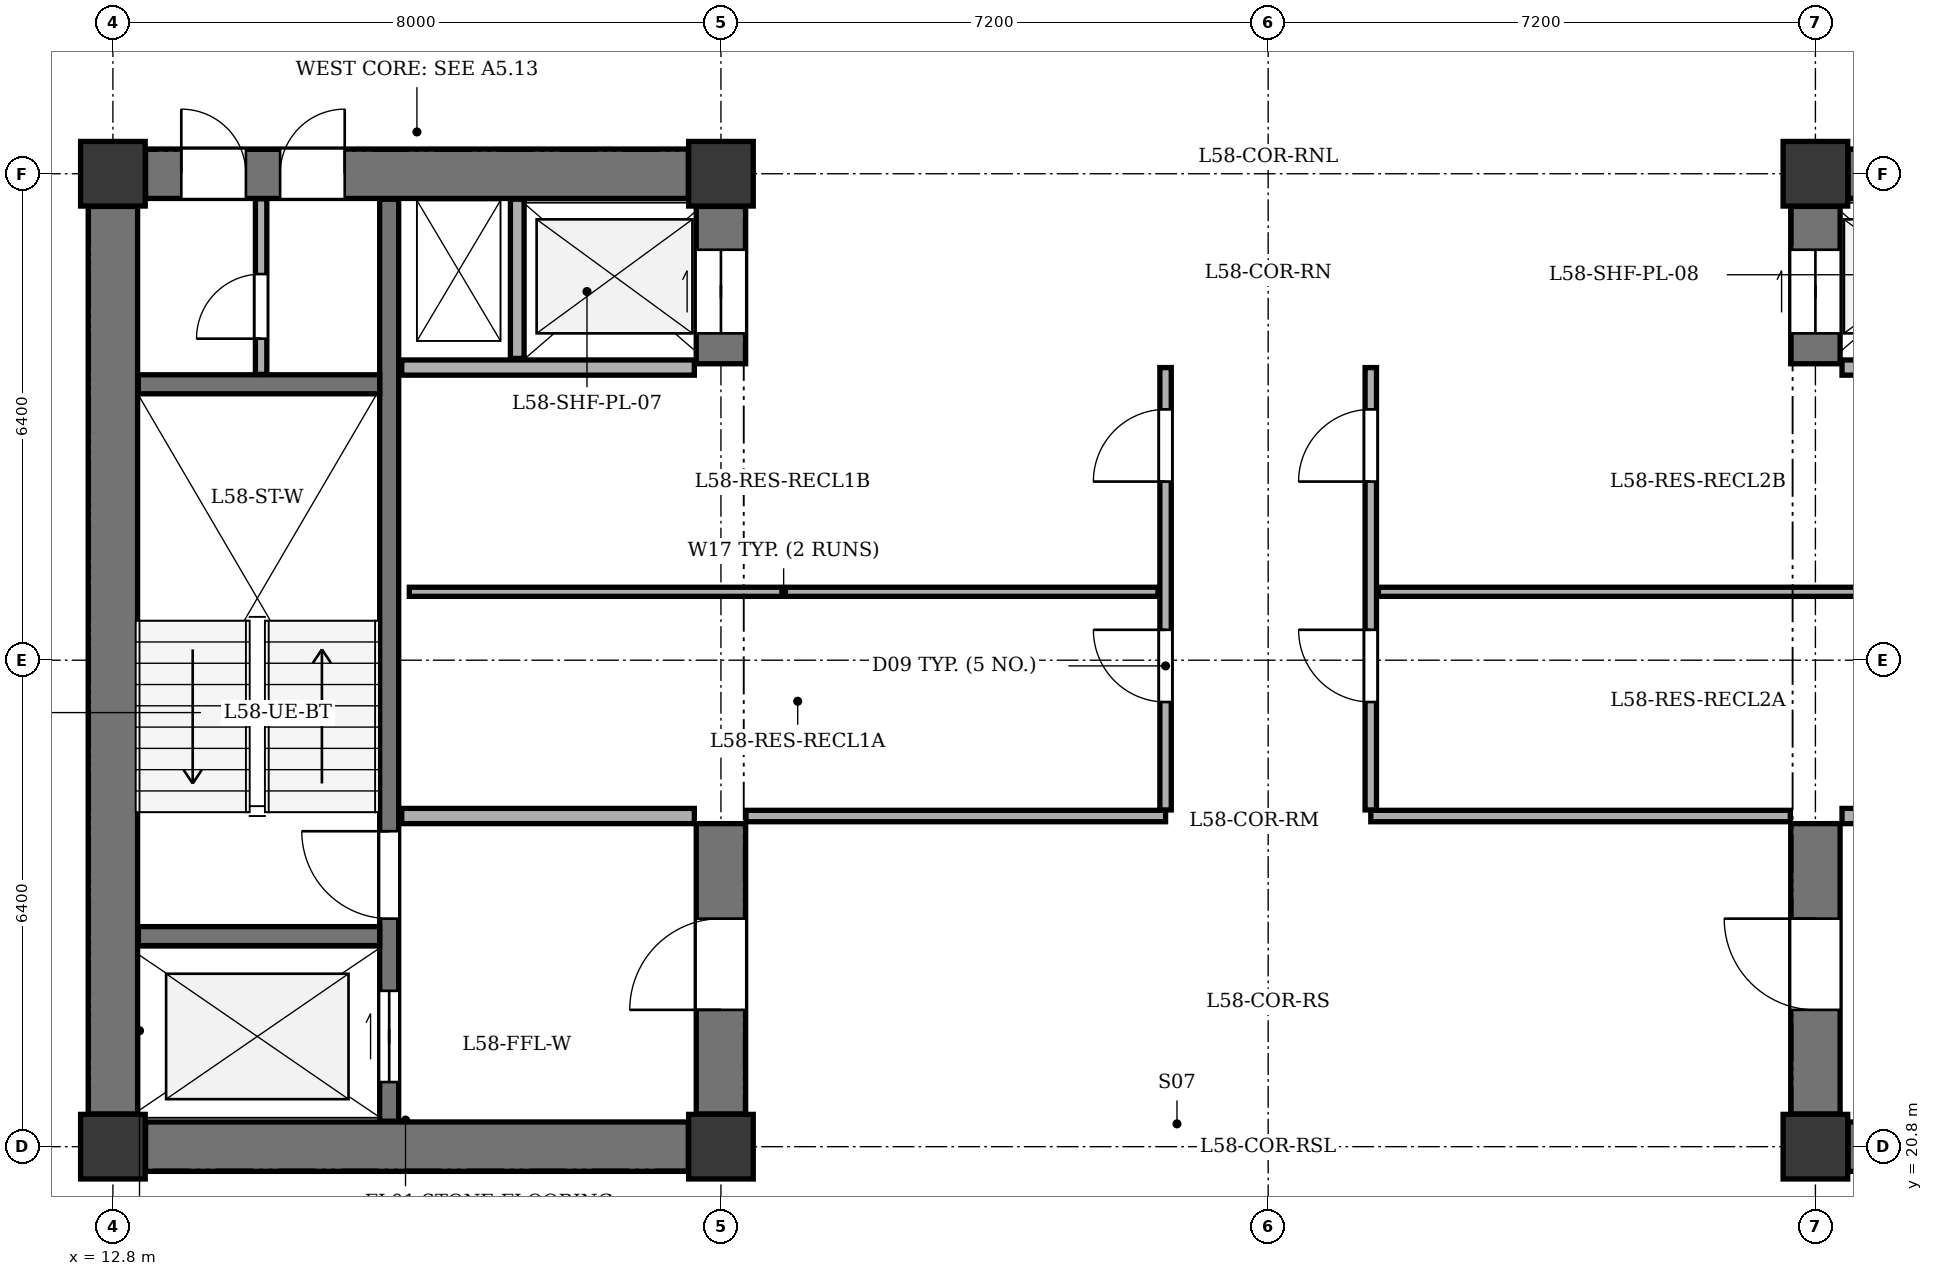
"""IFC4 building model, lengths in metres.
Left out: names, types, materials, properties, quantities, classifications, styles, units other than length and angle.
Written with IfcOpenShell. Run it as: python <this file> out.ifc"""

import sys

from ifc_helpers import new_model, si_unit, direction, frame, frame_2d, origin, origin_2d, place, context, subcontext, project, spatial, rectangle, extrude, element, fill, save


model = new_model("IFC4")
c1 = context("Model", 3, precision=1e-05, world=origin(), true_north=direction((0.0, 1.0)))
c2 = subcontext(c1, "Body", "Model", "MODEL_VIEW")
j1 = project(units=[si_unit("LENGTHUNIT", "METRE"), si_unit("PLANEANGLEUNIT", "RADIAN")], contexts=[c1])
p1 = place(None, origin())
s1 = spatial("IfcSite", under=j1, at=p1, CompositionType="ELEMENT")
p2 = place(p1, origin())
s2 = spatial("IfcBuilding", under=s1, at=p2, CompositionType="ELEMENT")
p3 = place(p2, frame((0.0, 0.0, 224.5)))
s3 = spatial("IfcBuildingStorey", under=s2, at=p3, CompositionType="ELEMENT", Elevation=224.5)
for number, where, z_axis, x_axis in (
    (1, (12.8, 20.8, 0.0), (0.0, 0.0, 1.0), (1.0, 0.0, 0.0)),
    (2, (20.8, 20.8, 0.0), (0.0, 0.0, 1.0), (1.0, 0.0, 0.0)),
    (3, (12.8, 33.6, 0.0), (0.0, 0.0, 1.0), (1.0, 0.0, 0.0)),
    (4, (20.8, 33.6, 0.0), (0.0, 0.0, 1.0), (1.0, 0.0, 0.0)),
    (5, (35.2, 20.8, 0.0), (0.0, 0.0, 1.0), (1.0, 0.0, 0.0)),
    (6, (35.2, 33.6, 0.0), (0.0, 0.0, 1.0), (1.0, 0.0, 0.0)),
):
    element("IfcColumn", number, at=place(p3, frame(where, z_axis=z_axis, x_axis=x_axis)), inside=s3, PredefinedType="COLUMN", context=c2, shape_type="SweptSolid", body=[
        extrude(rectangle(XDim=0.85, YDim=0.85, at=origin_2d()), origin(), (0.0, 0.0, 1.0), 3.4),
    ])
p4 = place(p3, frame((12.8, 21.23, 0.0), z_axis=(0.0, 0.0, 1.0), x_axis=(0.0, 1.0, 0.0)))
e7 = element("IfcWall", 7, at=p4, inside=s3, PredefinedType="SHEAR", context=c2, shape_type="SweptSolid", body=[
    extrude(rectangle(XDim=11.94, YDim=0.65, at=frame_2d((5.97, 0.0))), origin(), (0.0, 0.0, 1.0), 2.95),
])
p5 = place(p3, frame((13.23, 20.8, 0.0), z_axis=(0.0, 0.0, 1.0), x_axis=(1.0, 0.0, 0.0)))
e8 = element("IfcWall", 8, at=p5, inside=s3, PredefinedType="SHEAR", context=c2, shape_type="SweptSolid", body=[
    extrude(rectangle(XDim=7.14, YDim=0.65, at=frame_2d((3.57, 0.0))), origin(), (0.0, 0.0, 1.0), 2.95),
])
p6 = place(p3, frame((13.23, 33.6, 0.0), z_axis=(0.0, 0.0, 1.0), x_axis=(1.0, 0.0, 0.0)))
e9 = element("IfcWall", 9, at=p6, inside=s3, PredefinedType="SHEAR", context=c2, shape_type="SweptSolid", body=[
    extrude(rectangle(XDim=7.14, YDim=0.65, at=frame_2d((3.57, 0.0))), origin(), (0.0, 0.0, 1.0), 2.95),
])
p7 = place(p6, frame((0.47, 0.0, 0.0)))
e10 = element("IfcOpeningElement", 10, at=p7, cuts=e9, PredefinedType="OPENING", context=c2, shape_type="SweptSolid", body=[
    extrude(rectangle(XDim=0.85, YDim=2.02, at=frame_2d((0.425, 1.01))), frame((0.0, 0.335, 0.0), z_axis=(0.0, -1.0, 0.0), x_axis=(1.0, 0.0, 0.0)), (0.0, 0.0, 1.0), 0.67),
])
p8 = place(p6, frame((1.77, 0.0, 0.0)))
e11 = element("IfcOpeningElement", 11, at=p8, cuts=e9, PredefinedType="OPENING", context=c2, shape_type="SweptSolid", body=[
    extrude(rectangle(XDim=0.85, YDim=2.02, at=frame_2d((0.425, 1.01))), frame((0.0, 0.335, 0.0), z_axis=(0.0, -1.0, 0.0), x_axis=(1.0, 0.0, 0.0)), (0.0, 0.0, 1.0), 0.67),
])
p9 = place(p3, frame((20.8, 21.23, 0.0), z_axis=(0.0, 0.0, 1.0), x_axis=(0.0, 1.0, 0.0)))
e12 = element("IfcWall", 12, at=p9, inside=s3, PredefinedType="SHEAR", context=c2, shape_type="SweptSolid", body=[
    extrude(rectangle(XDim=3.82, YDim=0.65, at=frame_2d((1.91, 0.0))), origin(), (0.0, 0.0, 1.0), 2.95),
])
p10 = place(p9, frame((1.37, 0.0, 0.0)))
e13 = element("IfcOpeningElement", 13, at=p10, cuts=e12, PredefinedType="OPENING", context=c2, shape_type="SweptSolid", body=[
    extrude(rectangle(XDim=1.2, YDim=2.15, at=frame_2d((0.6, 1.075))), frame((0.0, 0.335, 0.0), z_axis=(0.0, -1.0, 0.0), x_axis=(1.0, 0.0, 0.0)), (0.0, 0.0, 1.0), 0.67),
])
p11 = place(p3, frame((20.8, 31.1, 0.0), z_axis=(0.0, 0.0, 1.0), x_axis=(0.0, 1.0, 0.0)))
e14 = element("IfcWall", 14, at=p11, inside=s3, PredefinedType="SHEAR", context=c2, shape_type="SweptSolid", body=[
    extrude(rectangle(XDim=2.07, YDim=0.65, at=frame_2d((1.035, 0.0))), origin(), (0.0, 0.0, 1.0), 2.95),
])
p12 = place(p11, frame((0.4, 0.0, 0.0)))
e15 = element("IfcOpeningElement", 15, at=p12, cuts=e14, PredefinedType="OPENING", context=c2, shape_type="SweptSolid", body=[
    extrude(rectangle(XDim=1.1, YDim=2.1, at=frame_2d((0.55, 1.05))), frame((0.0, 0.335, 0.0), z_axis=(0.0, -1.0, 0.0), x_axis=(1.0, 0.0, 0.0)), (0.0, 0.0, 1.0), 0.67),
])
p13 = place(p3, frame((16.435, 21.135, 0.0), z_axis=(0.0, 0.0, 1.0), x_axis=(0.0, 1.0, 0.0)))
e16 = element("IfcWall", 16, at=p13, inside=s3, PredefinedType="SHEAR", context=c2, shape_type="SweptSolid", body=[
    extrude(rectangle(XDim=12.13, YDim=0.25, at=frame_2d((6.065, 0.0))), origin(), (0.0, 0.0, 1.0), 2.95),
])
p14 = place(p13, frame((0.515, 0.0, 0.0)))
e17 = element("IfcOpeningElement", 17, at=p14, cuts=e16, PredefinedType="OPENING", context=c2, shape_type="SweptSolid", body=[
    extrude(rectangle(XDim=1.2, YDim=2.15, at=frame_2d((0.6, 1.075))), frame((0.0, 0.135, 0.0), z_axis=(0.0, -1.0, 0.0), x_axis=(1.0, 0.0, 0.0)), (0.0, 0.0, 1.0), 0.27),
])
p15 = place(p13, frame((2.665, 0.0, 0.0)))
e18 = element("IfcOpeningElement", 18, at=p15, cuts=e16, PredefinedType="OPENING", context=c2, shape_type="SweptSolid", body=[
    extrude(rectangle(XDim=1.15, YDim=2.15, at=frame_2d((0.575, 1.075))), frame((0.0, 0.135, 0.0), z_axis=(0.0, -1.0, 0.0), x_axis=(1.0, 0.0, 0.0)), (0.0, 0.0, 1.0), 0.27),
])
for number, where, z_axis, x_axis in (
    (19, (13.135, 23.57, 0.0), (0.0, 0.0, 1.0), (1.0, 0.0, 0.0)),
    (20, (13.135, 30.83, 0.0), (0.0, 0.0, 1.0), (1.0, 0.0, 0.0)),
):
    element("IfcWall", number, at=place(p3, frame(where, z_axis=z_axis, x_axis=x_axis)), inside=s3, PredefinedType="SHEAR", context=c2, shape_type="SweptSolid", body=[
        extrude(rectangle(XDim=3.175, YDim=0.25, at=frame_2d((1.587, 0.0))), origin(), (0.0, 0.0, 1.0), 2.95),
    ])
for number, where, z_axis, x_axis in (
    (21, (16.6, 25.15, 0.0), (0.0, 0.0, 1.0), (1.0, 0.0, 0.0)),
    (22, (16.6, 31.05, 0.0), (0.0, 0.0, 1.0), (1.0, 0.0, 0.0)),
):
    element("IfcWall", number, at=place(p3, frame(where, z_axis=z_axis, x_axis=x_axis)), inside=s3, PredefinedType="SOLIDWALL", context=c2, shape_type="SweptSolid", body=[
        extrude(rectangle(XDim=3.85, YDim=0.2, at=frame_2d((1.925, 0.0))), origin(), (0.0, 0.0, 1.0), 2.95),
    ])
p16 = place(p3, frame((18.12, 31.17, 0.0), z_axis=(0.0, 0.0, 1.0), x_axis=(0.0, 1.0, 0.0)))
e23 = element("IfcWall", 23, at=p16, inside=s3, PredefinedType="PARTITIONING", context=c2, shape_type="SweptSolid", body=[
    extrude(rectangle(XDim=2.095, YDim=0.18, at=frame_2d((1.047, 0.0))), origin(), (0.0, 0.0, 1.0), 2.95),
])
p17 = place(p3, frame((35.63, 20.8, 0.0), z_axis=(0.0, 0.0, 1.0), x_axis=(1.0, 0.0, 0.0)))
e24 = element("IfcWall", 24, at=p17, inside=s3, PredefinedType="SHEAR", context=c2, shape_type="SweptSolid", body=[
    extrude(rectangle(XDim=7.14, YDim=0.65, at=frame_2d((3.57, 0.0))), origin(), (0.0, 0.0, 1.0), 2.95),
])
p18 = place(p3, frame((35.63, 33.6, 0.0), z_axis=(0.0, 0.0, 1.0), x_axis=(1.0, 0.0, 0.0)))
e25 = element("IfcWall", 25, at=p18, inside=s3, PredefinedType="SHEAR", context=c2, shape_type="SweptSolid", body=[
    extrude(rectangle(XDim=7.14, YDim=0.65, at=frame_2d((3.57, 0.0))), origin(), (0.0, 0.0, 1.0), 2.95),
])
p19 = place(p18, frame((4.77, 0.0, 0.0)))
e26 = element("IfcOpeningElement", 26, at=p19, cuts=e25, PredefinedType="OPENING", context=c2, shape_type="SweptSolid", body=[
    extrude(rectangle(XDim=1.3, YDim=2.15, at=frame_2d((0.65, 1.075))), frame((0.0, 0.335, 0.0), z_axis=(0.0, -1.0, 0.0), x_axis=(1.0, 0.0, 0.0)), (0.0, 0.0, 1.0), 0.67),
])
p20 = place(p18, frame((2.57, 0.0, 0.0)))
e27 = element("IfcOpeningElement", 27, at=p20, cuts=e25, PredefinedType="OPENING", context=c2, shape_type="SweptSolid", body=[
    extrude(rectangle(XDim=0.85, YDim=2.02, at=frame_2d((0.425, 1.01))), frame((0.0, 0.335, 0.0), z_axis=(0.0, -1.0, 0.0), x_axis=(1.0, 0.0, 0.0)), (0.0, 0.0, 1.0), 0.67),
])
p21 = place(p3, frame((35.2, 21.23, 0.0), z_axis=(0.0, 0.0, 1.0), x_axis=(0.0, 1.0, 0.0)))
e28 = element("IfcWall", 28, at=p21, inside=s3, PredefinedType="SHEAR", context=c2, shape_type="SweptSolid", body=[
    extrude(rectangle(XDim=3.82, YDim=0.65, at=frame_2d((1.91, 0.0))), origin(), (0.0, 0.0, 1.0), 2.95),
])
p22 = place(p21, frame((1.37, 0.0, 0.0)))
e29 = element("IfcOpeningElement", 29, at=p22, cuts=e28, PredefinedType="OPENING", context=c2, shape_type="SweptSolid", body=[
    extrude(rectangle(XDim=1.2, YDim=2.15, at=frame_2d((0.6, 1.075))), frame((0.0, 0.335, 0.0), z_axis=(0.0, -1.0, 0.0), x_axis=(1.0, 0.0, 0.0)), (0.0, 0.0, 1.0), 0.67),
])
p23 = place(p3, frame((35.2, 31.1, 0.0), z_axis=(0.0, 0.0, 1.0), x_axis=(0.0, 1.0, 0.0)))
e30 = element("IfcWall", 30, at=p23, inside=s3, PredefinedType="SHEAR", context=c2, shape_type="SweptSolid", body=[
    extrude(rectangle(XDim=2.07, YDim=0.65, at=frame_2d((1.035, 0.0))), origin(), (0.0, 0.0, 1.0), 2.95),
])
p24 = place(p23, frame((0.4, 0.0, 0.0)))
e31 = element("IfcOpeningElement", 31, at=p24, cuts=e30, PredefinedType="OPENING", context=c2, shape_type="SweptSolid", body=[
    extrude(rectangle(XDim=1.1, YDim=2.1, at=frame_2d((0.55, 1.05))), frame((0.0, 0.335, 0.0), z_axis=(0.0, -1.0, 0.0), x_axis=(1.0, 0.0, 0.0)), (0.0, 0.0, 1.0), 0.67),
])
p25 = place(p3, frame((35.55, 25.15, 0.0), z_axis=(0.0, 0.0, 1.0), x_axis=(1.0, 0.0, 0.0)))
e32 = element("IfcWall", 32, at=p25, inside=s3, PredefinedType="SOLIDWALL", context=c2, shape_type="SweptSolid", body=[
    extrude(rectangle(XDim=3.85, YDim=0.2, at=frame_2d((1.925, 0.0))), origin(), (0.0, 0.0, 1.0), 2.95),
])
p26 = place(p3, frame((35.55, 31.05, 0.0), z_axis=(0.0, 0.0, 1.0), x_axis=(1.0, 0.0, 0.0)))
e33 = element("IfcWall", 33, at=p26, inside=s3, PredefinedType="SOLIDWALL", context=c2, shape_type="SweptSolid", body=[
    extrude(rectangle(XDim=2.25, YDim=0.2, at=frame_2d((1.125, 0.0))), origin(), (0.0, 0.0, 1.0), 2.95),
])
p27 = place(p3, frame((14.75, 30.96, 0.0), z_axis=(0.0, 0.0, 1.0), x_axis=(0.0, 1.0, 0.0)))
e34 = element("IfcWall", 34, at=p27, inside=s3, PredefinedType="PARTITIONING", context=c2, shape_type="SweptSolid", body=[
    extrude(rectangle(XDim=2.31, YDim=0.15, at=frame_2d((1.155, 0.0))), origin(), (0.0, 0.0, 1.0), 2.95),
])
p28 = place(p27, frame((0.47, 0.0, 0.0)))
e35 = element("IfcOpeningElement", 35, at=p28, cuts=e34, PredefinedType="OPENING", context=c2, shape_type="SweptSolid", body=[
    extrude(rectangle(XDim=0.85, YDim=2.02, at=frame_2d((0.425, 1.01))), frame((0.0, 0.085, 0.0), z_axis=(0.0, -1.0, 0.0), x_axis=(1.0, 0.0, 0.0)), (0.0, 0.0, 1.0), 0.17),
])
for number, where, z_axis, x_axis in (
    (36, (21.13, 25.15, 0.0), (0.0, 0.0, 1.0), (1.0, 0.0, 0.0)),
    (37, (29.35, 25.15, 0.0), (0.0, 0.0, 1.0), (1.0, 0.0, 0.0)),
):
    element("IfcWall", number, at=place(p3, frame(where, z_axis=z_axis, x_axis=x_axis)), inside=s3, PredefinedType="PARTITIONING", context=c2, shape_type="SweptSolid", body=[
        extrude(rectangle(XDim=5.52, YDim=0.15, at=frame_2d((2.76, 0.0))), origin(), (0.0, 0.0, 1.0), 2.95),
    ])
p29 = place(p3, frame((26.65, 25.23, 0.0), z_axis=(0.0, 0.0, 1.0), x_axis=(0.0, 1.0, 0.0)))
e38 = element("IfcWall", 38, at=p29, inside=s3, PredefinedType="PARTITIONING", context=c2, shape_type="SweptSolid", body=[
    extrude(rectangle(XDim=5.82, YDim=0.15, at=frame_2d((2.91, 0.0))), origin(), (0.0, 0.0, 1.0), 2.95),
])
p30 = place(p29, frame((1.42, 0.0, 0.0)))
e39 = element("IfcOpeningElement", 39, at=p30, cuts=e38, PredefinedType="OPENING", context=c2, shape_type="SweptSolid", body=[
    extrude(rectangle(XDim=0.95, YDim=2.1, at=frame_2d((0.475, 1.05))), frame((0.0, 0.085, 0.0), z_axis=(0.0, -1.0, 0.0), x_axis=(1.0, 0.0, 0.0)), (0.0, 0.0, 1.0), 0.17),
])
p31 = place(p29, frame((4.32, 0.0, 0.0)))
e40 = element("IfcOpeningElement", 40, at=p31, cuts=e38, PredefinedType="OPENING", context=c2, shape_type="SweptSolid", body=[
    extrude(rectangle(XDim=0.95, YDim=2.1, at=frame_2d((0.475, 1.05))), frame((0.0, 0.085, 0.0), z_axis=(0.0, -1.0, 0.0), x_axis=(1.0, 0.0, 0.0)), (0.0, 0.0, 1.0), 0.17),
])
p32 = place(p3, frame((16.7, 28.1, 0.0), z_axis=(0.0, 0.0, 1.0), x_axis=(1.0, 0.0, 0.0)))
e41 = element("IfcWall", 41, at=p32, inside=s3, PredefinedType="PARTITIONING", context=c2, shape_type="SweptSolid", body=[
    extrude(rectangle(XDim=9.85, YDim=0.12, at=frame_2d((4.925, 0.0))), origin(), (0.0, 0.0, 1.0), 2.95),
])
p33 = place(p3, frame((29.35, 25.23, 0.0), z_axis=(0.0, 0.0, 1.0), x_axis=(0.0, 1.0, 0.0)))
e42 = element("IfcWall", 42, at=p33, inside=s3, PredefinedType="PARTITIONING", context=c2, shape_type="SweptSolid", body=[
    extrude(rectangle(XDim=5.82, YDim=0.15, at=frame_2d((2.91, 0.0))), origin(), (0.0, 0.0, 1.0), 2.95),
])
p34 = place(p33, frame((1.42, 0.0, 0.0)))
e43 = element("IfcOpeningElement", 43, at=p34, cuts=e42, PredefinedType="OPENING", context=c2, shape_type="SweptSolid", body=[
    extrude(rectangle(XDim=0.95, YDim=2.1, at=frame_2d((0.475, 1.05))), frame((0.0, 0.085, 0.0), z_axis=(0.0, -1.0, 0.0), x_axis=(1.0, 0.0, 0.0)), (0.0, 0.0, 1.0), 0.17),
])
p35 = place(p33, frame((4.32, 0.0, 0.0)))
e44 = element("IfcOpeningElement", 44, at=p35, cuts=e42, PredefinedType="OPENING", context=c2, shape_type="SweptSolid", body=[
    extrude(rectangle(XDim=0.95, YDim=2.1, at=frame_2d((0.475, 1.05))), frame((0.0, 0.085, 0.0), z_axis=(0.0, -1.0, 0.0), x_axis=(1.0, 0.0, 0.0)), (0.0, 0.0, 1.0), 0.17),
])
p36 = place(p3, frame((29.45, 28.1, 0.0), z_axis=(0.0, 0.0, 1.0), x_axis=(1.0, 0.0, 0.0)))
e45 = element("IfcWall", 45, at=p36, inside=s3, PredefinedType="PARTITIONING", context=c2, shape_type="SweptSolid", body=[
    extrude(rectangle(XDim=8.345, YDim=0.12, at=frame_2d((4.172, 0.0))), origin(), (0.0, 0.0, 1.0), 2.95),
])
p37 = place(p7, origin())
e46 = element("IfcDoor", 46, at=p37, inside=s3, OperationType="SINGLE_SWING_LEFT", PredefinedType="DOOR", context=c2, shape_type="SweptSolid", body=[
    extrude(rectangle(XDim=0.85, YDim=2.02, at=frame_2d((0.425, 1.01))), frame((0.0, 0.025, 0.0), z_axis=(0.0, -1.0, 0.0), x_axis=(1.0, 0.0, 0.0)), (0.0, 0.0, 1.0), 0.05),
])
fill(e10, e46)
p38 = place(p8, origin())
e47 = element("IfcDoor", 47, at=p38, inside=s3, OperationType="SINGLE_SWING_RIGHT", PredefinedType="DOOR", context=c2, shape_type="SweptSolid", body=[
    extrude(rectangle(XDim=0.85, YDim=2.02, at=frame_2d((0.425, 1.01))), frame((0.0, 0.025, 0.0), z_axis=(0.0, -1.0, 0.0), x_axis=(1.0, 0.0, 0.0)), (0.0, 0.0, 1.0), 0.05),
])
fill(e11, e47)
p39 = place(p10, origin())
e48 = element("IfcDoor", 48, at=p39, inside=s3, OperationType="SINGLE_SWING_LEFT", PredefinedType="DOOR", context=c2, shape_type="SweptSolid", body=[
    extrude(rectangle(XDim=1.2, YDim=2.15, at=frame_2d((0.6, 1.075))), frame((0.0, 0.025, 0.0), z_axis=(0.0, -1.0, 0.0), x_axis=(1.0, 0.0, 0.0)), (0.0, 0.0, 1.0), 0.05),
])
fill(e13, e48)
p40 = place(p12, origin())
e49 = element("IfcDoor", 49, at=p40, inside=s3, OperationType="DOUBLE_DOOR_SLIDING", PredefinedType="DOOR", context=c2, shape_type="SweptSolid", body=[
    extrude(rectangle(XDim=1.1, YDim=2.1, at=frame_2d((0.55, 1.05))), frame((0.0, 0.025, 0.0), z_axis=(0.0, -1.0, 0.0), x_axis=(1.0, 0.0, 0.0)), (0.0, 0.0, 1.0), 0.05),
])
fill(e15, e49)
p41 = place(p14, origin())
e50 = element("IfcDoor", 50, at=p41, inside=s3, OperationType="DOUBLE_DOOR_SLIDING", PredefinedType="DOOR", context=c2, shape_type="SweptSolid", body=[
    extrude(rectangle(XDim=1.2, YDim=2.15, at=frame_2d((0.6, 1.075))), frame((0.0, 0.025, 0.0), z_axis=(0.0, -1.0, 0.0), x_axis=(1.0, 0.0, 0.0)), (0.0, 0.0, 1.0), 0.05),
])
fill(e17, e50)
p42 = place(p15, origin())
e51 = element("IfcDoor", 51, at=p42, inside=s3, OperationType="SINGLE_SWING_RIGHT", PredefinedType="DOOR", context=c2, shape_type="SweptSolid", body=[
    extrude(rectangle(XDim=1.15, YDim=2.15, at=frame_2d((0.575, 1.075))), frame((0.0, 0.025, 0.0), z_axis=(0.0, -1.0, 0.0), x_axis=(1.0, 0.0, 0.0)), (0.0, 0.0, 1.0), 0.05),
])
fill(e18, e51)
p43 = place(p22, origin())
e52 = element("IfcDoor", 52, at=p43, inside=s3, OperationType="SINGLE_SWING_RIGHT", PredefinedType="DOOR", context=c2, shape_type="SweptSolid", body=[
    extrude(rectangle(XDim=1.2, YDim=2.15, at=frame_2d((0.6, 1.075))), frame((0.0, 0.025, 0.0), z_axis=(0.0, -1.0, 0.0), x_axis=(1.0, 0.0, 0.0)), (0.0, 0.0, 1.0), 0.05),
])
fill(e29, e52)
p44 = place(p24, origin())
e53 = element("IfcDoor", 53, at=p44, inside=s3, OperationType="DOUBLE_DOOR_SLIDING", PredefinedType="DOOR", context=c2, shape_type="SweptSolid", body=[
    extrude(rectangle(XDim=1.1, YDim=2.1, at=frame_2d((0.55, 1.05))), frame((0.0, 0.025, 0.0), z_axis=(0.0, -1.0, 0.0), x_axis=(1.0, 0.0, 0.0)), (0.0, 0.0, 1.0), 0.05),
])
fill(e31, e53)
p45 = place(p28, origin())
e54 = element("IfcDoor", 54, at=p45, inside=s3, OperationType="SINGLE_SWING_LEFT", PredefinedType="DOOR", context=c2, shape_type="SweptSolid", body=[
    extrude(rectangle(XDim=0.85, YDim=2.02, at=frame_2d((0.425, 1.01))), frame((0.0, 0.025, 0.0), z_axis=(0.0, -1.0, 0.0), x_axis=(1.0, 0.0, 0.0)), (0.0, 0.0, 1.0), 0.05),
])
fill(e35, e54)
p46 = place(p30, origin())
e55 = element("IfcDoor", 55, at=p46, inside=s3, OperationType="SINGLE_SWING_RIGHT", PredefinedType="DOOR", context=c2, shape_type="SweptSolid", body=[
    extrude(rectangle(XDim=0.95, YDim=2.1, at=frame_2d((0.475, 1.05))), frame((0.0, 0.025, 0.0), z_axis=(0.0, -1.0, 0.0), x_axis=(1.0, 0.0, 0.0)), (0.0, 0.0, 1.0), 0.05),
])
fill(e39, e55)
p47 = place(p31, origin())
e56 = element("IfcDoor", 56, at=p47, inside=s3, OperationType="SINGLE_SWING_LEFT", PredefinedType="DOOR", context=c2, shape_type="SweptSolid", body=[
    extrude(rectangle(XDim=0.95, YDim=2.1, at=frame_2d((0.475, 1.05))), frame((0.0, 0.025, 0.0), z_axis=(0.0, -1.0, 0.0), x_axis=(1.0, 0.0, 0.0)), (0.0, 0.0, 1.0), 0.05),
])
fill(e40, e56)
p48 = place(p34, origin())
e57 = element("IfcDoor", 57, at=p48, inside=s3, OperationType="SINGLE_SWING_RIGHT", PredefinedType="DOOR", context=c2, shape_type="SweptSolid", body=[
    extrude(rectangle(XDim=0.95, YDim=2.1, at=frame_2d((0.475, 1.05))), frame((0.0, 0.025, 0.0), z_axis=(0.0, -1.0, 0.0), x_axis=(1.0, 0.0, 0.0)), (0.0, 0.0, 1.0), 0.05),
])
fill(e43, e57)
p49 = place(p35, origin())
e58 = element("IfcDoor", 58, at=p49, inside=s3, OperationType="SINGLE_SWING_LEFT", PredefinedType="DOOR", context=c2, shape_type="SweptSolid", body=[
    extrude(rectangle(XDim=0.95, YDim=2.1, at=frame_2d((0.475, 1.05))), frame((0.0, 0.025, 0.0), z_axis=(0.0, -1.0, 0.0), x_axis=(1.0, 0.0, 0.0)), (0.0, 0.0, 1.0), 0.05),
])
fill(e44, e58)
save(model, sys.argv[1])
